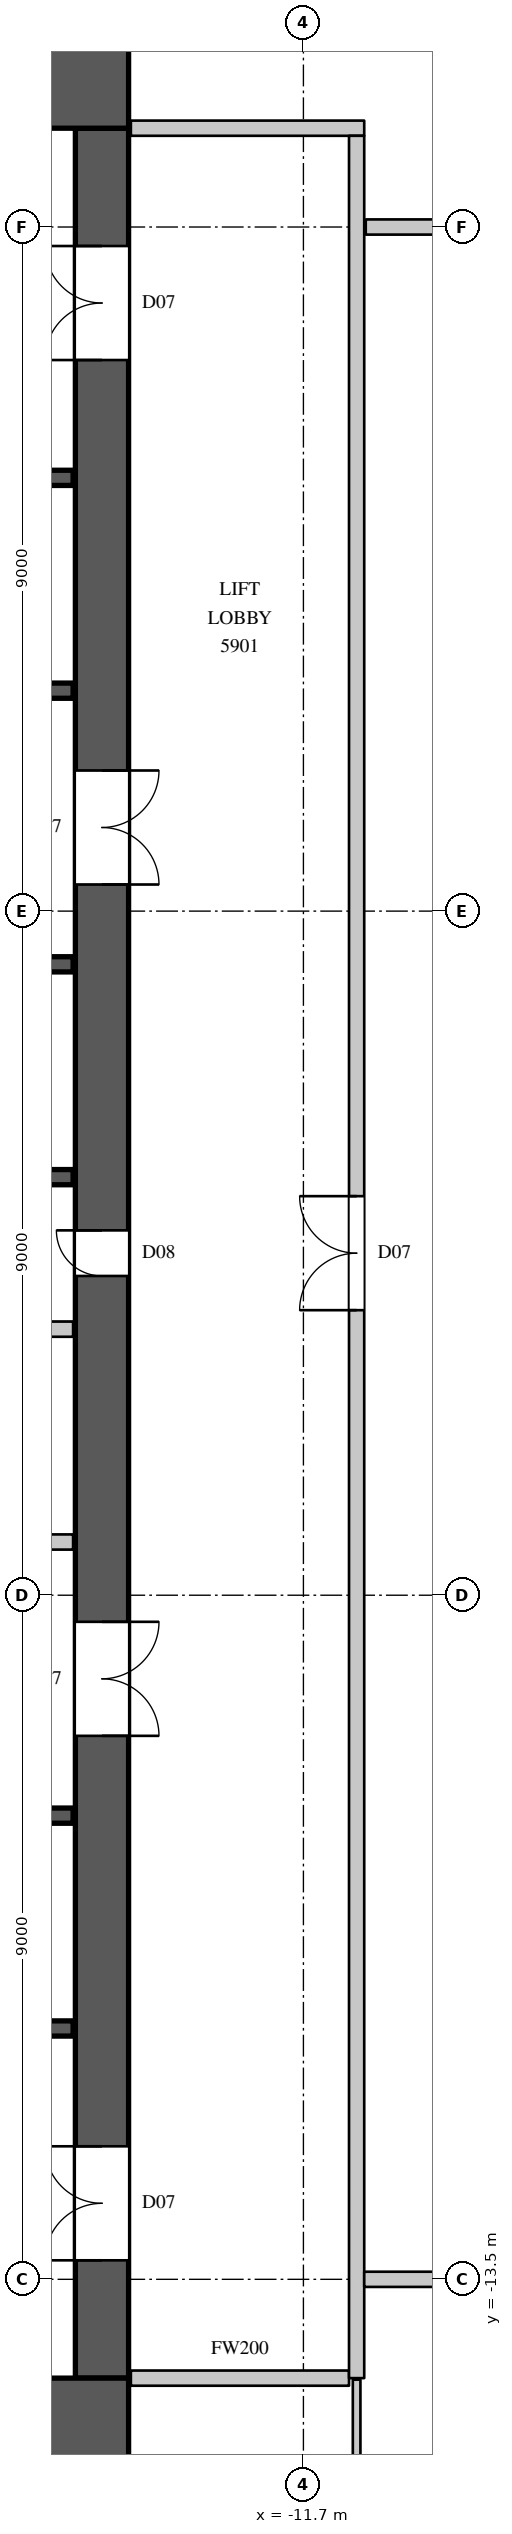
"""IFC4 building model, lengths in metres.
Left out: names, types, materials, properties, quantities, classifications, styles, units other than length and angle.
Written with IfcOpenShell. Run it as: python <this file> out.ifc"""

import sys

from ifc_helpers import new_model, si_unit, direction, frame, frame_2d, origin, place, context, subcontext, project, spatial, rectangle, extrude, element, fill, save


model = new_model("IFC4")
c1 = context("Model", 3, precision=1e-05, world=origin(), true_north=direction((0.0, 1.0)))
c2 = subcontext(c1, "Body", "Model", "MODEL_VIEW")
j1 = project(units=[si_unit("LENGTHUNIT", "METRE"), si_unit("PLANEANGLEUNIT", "RADIAN")], contexts=[c1])
p1 = place(None, origin())
s1 = spatial("IfcSite", under=j1, at=p1, CompositionType="ELEMENT")
p2 = place(p1, origin())
s2 = spatial("IfcBuilding", under=s1, at=p2, CompositionType="ELEMENT")
p3 = place(p2, frame((0.0, 0.0, 263.9)))
s3 = spatial("IfcBuildingStorey", under=s2, at=p3, CompositionType="ELEMENT", Elevation=263.9)
for number, where, z_axis, x_axis in (
    (1, (-30.0, 15.4, 0.0), (0.0, 0.0, 1.0), (1.0, 0.0, 0.0)),
    (2, (-30.0, -15.4, 0.0), (0.0, 0.0, 1.0), (1.0, 0.0, 0.0)),
):
    element("IfcWall", number, at=place(p3, frame(where, z_axis=z_axis, x_axis=x_axis)), inside=s3, PredefinedType="SHEAR", context=c2, shape_type="SweptSolid", body=[
        extrude(rectangle(XDim=16.0, YDim=1.2, at=frame_2d((8.0, 0.0))), origin(), (0.0, 0.0, 1.0), 4.1),
    ])
p4 = place(p3, frame((-14.35, -14.8, 0.0), z_axis=(0.0, 0.0, 1.0), x_axis=(0.0, 1.0, 0.0)))
e3 = element("IfcWall", 3, at=p4, inside=s3, PredefinedType="SHEAR", context=c2, shape_type="SweptSolid", body=[
    extrude(rectangle(XDim=29.6, YDim=0.7, at=frame_2d((14.8, 0.0))), origin(), (0.0, 0.0, 1.0), 4.1),
])
p5 = place(p4, frame((1.55, 0.0, 0.0)))
e4 = element("IfcOpeningElement", 4, at=p5, cuts=e3, PredefinedType="OPENING", context=c2, shape_type="SweptSolid", body=[
    extrude(rectangle(XDim=1.5, YDim=2.4, at=frame_2d((0.75, 1.2))), frame((0.0, 0.36, 0.0), z_axis=(0.0, -1.0, 0.0), x_axis=(1.0, 0.0, 0.0)), (0.0, 0.0, 1.0), 0.72),
])
p6 = place(p4, frame((26.55, 0.0, 0.0)))
e5 = element("IfcOpeningElement", 5, at=p6, cuts=e3, PredefinedType="OPENING", context=c2, shape_type="SweptSolid", body=[
    extrude(rectangle(XDim=1.5, YDim=2.4, at=frame_2d((0.75, 1.2))), frame((0.0, 0.36, 0.0), z_axis=(0.0, -1.0, 0.0), x_axis=(1.0, 0.0, 0.0)), (0.0, 0.0, 1.0), 0.72),
])
p7 = place(p4, frame((8.45, 0.0, 0.0)))
e6 = element("IfcOpeningElement", 6, at=p7, cuts=e3, PredefinedType="OPENING", context=c2, shape_type="SweptSolid", body=[
    extrude(rectangle(XDim=1.5, YDim=2.4, at=frame_2d((0.75, 1.2))), frame((0.0, 0.36, 0.0), z_axis=(0.0, -1.0, 0.0), x_axis=(1.0, 0.0, 0.0)), (0.0, 0.0, 1.0), 0.72),
])
p8 = place(p4, frame((19.65, 0.0, 0.0)))
e7 = element("IfcOpeningElement", 7, at=p8, cuts=e3, PredefinedType="OPENING", context=c2, shape_type="SweptSolid", body=[
    extrude(rectangle(XDim=1.5, YDim=2.4, at=frame_2d((0.75, 1.2))), frame((0.0, 0.36, 0.0), z_axis=(0.0, -1.0, 0.0), x_axis=(1.0, 0.0, 0.0)), (0.0, 0.0, 1.0), 0.72),
])
p9 = place(p4, frame((14.5, 0.0, 0.0)))
e8 = element("IfcOpeningElement", 8, at=p9, cuts=e3, PredefinedType="OPENING", context=c2, shape_type="SweptSolid", body=[
    extrude(rectangle(XDim=0.6, YDim=2.0, at=frame_2d((0.3, 1.0))), frame((0.0, 0.36, 0.0), z_axis=(0.0, -1.0, 0.0), x_axis=(1.0, 0.0, 0.0)), (0.0, 0.0, 1.0), 0.72),
])
p10 = place(p3, frame((-29.27, -3.8, 0.0), z_axis=(0.0, 0.0, 1.0), x_axis=(1.0, 0.0, 0.0)))
e9 = element("IfcWall", 9, at=p10, inside=s3, PredefinedType="PARTITIONING", context=c2, shape_type="SweptSolid", body=[
    extrude(rectangle(XDim=14.54, YDim=0.2, at=frame_2d((7.27, 0.0))), origin(), (0.0, 0.0, 1.0), 3.8),
])
p11 = place(p10, frame((6.8, 0.0, 0.0)))
e10 = element("IfcOpeningElement", 10, at=p11, cuts=e9, PredefinedType="OPENING", context=c2, shape_type="SweptSolid", body=[
    extrude(rectangle(XDim=0.9, YDim=2.2, at=frame_2d((0.45, 1.1))), frame((0.0, 0.11, 0.0), z_axis=(0.0, -1.0, 0.0), x_axis=(1.0, 0.0, 0.0)), (0.0, 0.0, 1.0), 0.22),
])
p12 = place(p3, frame((-13.97, -14.8, 0.0), z_axis=(0.0, 0.0, 1.0), x_axis=(1.0, 0.0, 0.0)))
e11 = element("IfcWall", 11, at=p12, inside=s3, PredefinedType="PARTITIONING", context=c2, shape_type="SweptSolid", body=[
    extrude(rectangle(XDim=2.87, YDim=0.2, at=frame_2d((1.435, 0.0))), origin(), (0.0, 0.0, 1.0), 3.8),
])
p13 = place(p3, frame((-13.97, 14.8, 0.0), z_axis=(0.0, 0.0, 1.0), x_axis=(1.0, 0.0, 0.0)))
e12 = element("IfcWall", 12, at=p13, inside=s3, PredefinedType="PARTITIONING", context=c2, shape_type="SweptSolid", body=[
    extrude(rectangle(XDim=3.07, YDim=0.2, at=frame_2d((1.535, 0.0))), origin(), (0.0, 0.0, 1.0), 3.8),
])
p14 = place(p3, frame((-11.0, -14.8, 0.0), z_axis=(0.0, 0.0, 1.0), x_axis=(0.0, 1.0, 0.0)))
e13 = element("IfcWall", 13, at=p14, inside=s3, PredefinedType="PARTITIONING", context=c2, shape_type="SweptSolid", body=[
    extrude(rectangle(XDim=29.5, YDim=0.2, at=frame_2d((14.75, 0.0))), origin(), (0.0, 0.0, 1.0), 3.8),
])
p15 = place(p14, frame((14.05, 0.0, 0.0)))
e14 = element("IfcOpeningElement", 14, at=p15, cuts=e13, PredefinedType="OPENING", context=c2, shape_type="SweptSolid", body=[
    extrude(rectangle(XDim=1.5, YDim=2.4, at=frame_2d((0.75, 1.2))), frame((0.0, 0.11, 0.0), z_axis=(0.0, -1.0, 0.0), x_axis=(1.0, 0.0, 0.0)), (0.0, 0.0, 1.0), 0.22),
])
p16 = place(p3, frame((-10.9, -13.5, 0.0), z_axis=(0.0, 0.0, 1.0), x_axis=(1.0, 0.0, 0.0)))
e15 = element("IfcWall", 15, at=p16, inside=s3, PredefinedType="PARTITIONING", context=c2, shape_type="SweptSolid", body=[
    extrude(rectangle(XDim=23.3, YDim=0.2, at=frame_2d((11.65, 0.0))), origin(), (0.0, 0.0, 1.0), 3.8),
])
p17 = place(p16, frame((1.1, 0.0, 0.0)))
e16 = element("IfcOpeningElement", 16, at=p17, cuts=e15, PredefinedType="OPENING", context=c2, shape_type="SweptSolid", body=[
    extrude(rectangle(XDim=0.9, YDim=2.2, at=frame_2d((0.45, 1.1))), frame((0.0, 0.11, 0.0), z_axis=(0.0, -1.0, 0.0), x_axis=(1.0, 0.0, 0.0)), (0.0, 0.0, 1.0), 0.22),
])
p18 = place(p16, frame((4.4, 0.0, 0.0)))
e17 = element("IfcOpeningElement", 17, at=p18, cuts=e15, PredefinedType="OPENING", context=c2, shape_type="SweptSolid", body=[
    extrude(rectangle(XDim=0.9, YDim=2.2, at=frame_2d((0.45, 1.1))), frame((0.0, 0.11, 0.0), z_axis=(0.0, -1.0, 0.0), x_axis=(1.0, 0.0, 0.0)), (0.0, 0.0, 1.0), 0.22),
])
p19 = place(p16, frame((7.25, 0.0, 0.0)))
e18 = element("IfcOpeningElement", 18, at=p19, cuts=e15, PredefinedType="OPENING", context=c2, shape_type="SweptSolid", body=[
    extrude(rectangle(XDim=0.9, YDim=2.2, at=frame_2d((0.45, 1.1))), frame((0.0, 0.11, 0.0), z_axis=(0.0, -1.0, 0.0), x_axis=(1.0, 0.0, 0.0)), (0.0, 0.0, 1.0), 0.22),
])
p20 = place(p16, frame((10.6, 0.0, 0.0)))
e19 = element("IfcOpeningElement", 19, at=p20, cuts=e15, PredefinedType="OPENING", context=c2, shape_type="SweptSolid", body=[
    extrude(rectangle(XDim=1.1, YDim=2.4, at=frame_2d((0.55, 1.2))), frame((0.0, 0.11, 0.0), z_axis=(0.0, -1.0, 0.0), x_axis=(1.0, 0.0, 0.0)), (0.0, 0.0, 1.0), 0.22),
])
p21 = place(p3, frame((-10.88, 13.5, 0.0), z_axis=(0.0, 0.0, 1.0), x_axis=(1.0, 0.0, 0.0)))
e20 = element("IfcWall", 20, at=p21, inside=s3, PredefinedType="PARTITIONING", context=c2, shape_type="SweptSolid", body=[
    extrude(rectangle(XDim=4.58, YDim=0.2, at=frame_2d((2.29, 0.0))), origin(), (0.0, 0.0, 1.0), 3.8),
])
p22 = place(p3, frame((-29.27, -1.0, 0.0), z_axis=(0.0, 0.0, 1.0), x_axis=(1.0, 0.0, 0.0)))
e21 = element("IfcWall", 21, at=p22, inside=s3, PredefinedType="PARTITIONING", context=c2, shape_type="SweptSolid", body=[
    extrude(rectangle(XDim=14.54, YDim=0.2, at=frame_2d((7.27, 0.0))), origin(), (0.0, 0.0, 1.0), 3.8),
])
p23 = place(p3, frame((-17.92, -10.2, 0.0), z_axis=(0.0, 0.0, 1.0), x_axis=(1.0, 0.0, 0.0)))
e22 = element("IfcWall", 22, at=p23, inside=s3, PredefinedType="SHEAR", context=c2, shape_type="SweptSolid", body=[
    extrude(rectangle(XDim=3.19, YDim=0.2, at=frame_2d((1.595, 0.0))), origin(), (0.0, 0.0, 1.0), 3.8),
])
p24 = place(p23, frame((1.05, 0.0, 0.0)))
e23 = element("IfcOpeningElement", 23, at=p24, cuts=e22, PredefinedType="OPENING", context=c2, shape_type="SweptSolid", body=[
    extrude(rectangle(XDim=1.1, YDim=2.2, at=frame_2d((0.55, 1.1))), frame((0.0, 0.11, 0.0), z_axis=(0.0, -1.0, 0.0), x_axis=(1.0, 0.0, 0.0)), (0.0, 0.0, 1.0), 0.22),
])
for number, where, z_axis, x_axis in (
    (24, (-17.9, -7.4, 0.0), (0.0, 0.0, 1.0), (1.0, 0.0, 0.0)),
    (25, (-17.9, 1.0, 0.0), (0.0, 0.0, 1.0), (1.0, 0.0, 0.0)),
):
    element("IfcWall", number, at=place(p3, frame(where, z_axis=z_axis, x_axis=x_axis)), inside=s3, PredefinedType="SHEAR", context=c2, shape_type="SweptSolid", body=[
        extrude(rectangle(XDim=3.17, YDim=0.2, at=frame_2d((1.585, 0.0))), origin(), (0.0, 0.0, 1.0), 3.8),
    ])
p25 = place(p3, frame((-17.9, 3.8, 0.0), z_axis=(0.0, 0.0, 1.0), x_axis=(1.0, 0.0, 0.0)))
e26 = element("IfcWall", 26, at=p25, inside=s3, PredefinedType="SHEAR", context=c2, shape_type="SweptSolid", body=[
    extrude(rectangle(XDim=3.17, YDim=0.2, at=frame_2d((1.585, 0.0))), origin(), (0.0, 0.0, 1.0), 3.8),
])
p26 = place(p25, frame((1.05, 0.0, 0.0)))
e27 = element("IfcOpeningElement", 27, at=p26, cuts=e26, PredefinedType="OPENING", context=c2, shape_type="SweptSolid", body=[
    extrude(rectangle(XDim=1.1, YDim=2.2, at=frame_2d((0.55, 1.1))), frame((0.0, 0.11, 0.0), z_axis=(0.0, -1.0, 0.0), x_axis=(1.0, 0.0, 0.0)), (0.0, 0.0, 1.0), 0.22),
])
p27 = place(p3, frame((-17.92, 7.4, 0.0), z_axis=(0.0, 0.0, 1.0), x_axis=(1.0, 0.0, 0.0)))
e28 = element("IfcWall", 28, at=p27, inside=s3, PredefinedType="SHEAR", context=c2, shape_type="SweptSolid", body=[
    extrude(rectangle(XDim=3.19, YDim=0.2, at=frame_2d((1.595, 0.0))), origin(), (0.0, 0.0, 1.0), 3.8),
])
p28 = place(p3, frame((-17.92, 10.2, 0.0), z_axis=(0.0, 0.0, 1.0), x_axis=(1.0, 0.0, 0.0)))
e29 = element("IfcWall", 29, at=p28, inside=s3, PredefinedType="SHEAR", context=c2, shape_type="SweptSolid", body=[
    extrude(rectangle(XDim=3.19, YDim=0.2, at=frame_2d((1.595, 0.0))), origin(), (0.0, 0.0, 1.0), 3.8),
])
p29 = place(p28, frame((1.05, 0.0, 0.0)))
e30 = element("IfcOpeningElement", 30, at=p29, cuts=e29, PredefinedType="OPENING", context=c2, shape_type="SweptSolid", body=[
    extrude(rectangle(XDim=1.1, YDim=2.2, at=frame_2d((0.55, 1.1))), frame((0.0, 0.11, 0.0), z_axis=(0.0, -1.0, 0.0), x_axis=(1.0, 0.0, 0.0)), (0.0, 0.0, 1.0), 0.22),
])
p30 = place(p3, frame((-11.0, -23.757, 0.0), z_axis=(0.0, 0.0, 1.0), x_axis=(0.0, 1.0, 0.0)))
e31 = element("IfcWall", 31, at=p30, inside=s3, PredefinedType="PARTITIONING", context=c2, shape_type="SweptSolid", body=[
    extrude(rectangle(XDim=8.937, YDim=0.1, at=frame_2d((4.468, 0.0))), origin(), (0.0, 0.0, 1.0), 3.8),
])
p31 = place(p15, origin())
e32 = element("IfcDoor", 32, at=p31, inside=s3, OperationType="DOUBLE_DOOR_SINGLE_SWING", PredefinedType="DOOR", context=c2, shape_type="SweptSolid", body=[
    extrude(rectangle(XDim=1.5, YDim=2.4, at=frame_2d((0.75, 1.2))), frame((0.0, 0.025, 0.0), z_axis=(0.0, -1.0, 0.0), x_axis=(1.0, 0.0, 0.0)), (0.0, 0.0, 1.0), 0.05),
])
fill(e14, e32)
p32 = place(p5, origin())
e33 = element("IfcDoor", 33, at=p32, inside=s3, OperationType="DOUBLE_DOOR_SINGLE_SWING", PredefinedType="DOOR", context=c2, shape_type="SweptSolid", body=[
    extrude(rectangle(XDim=1.5, YDim=2.4, at=frame_2d((0.75, 1.2))), frame((0.0, 0.345, 0.0), z_axis=(0.0, -1.0, 0.0), x_axis=(1.0, 0.0, 0.0)), (0.0, 0.0, 1.0), 0.05),
])
fill(e4, e33)
p33 = place(p6, origin())
e34 = element("IfcDoor", 34, at=p33, inside=s3, OperationType="DOUBLE_DOOR_SINGLE_SWING", PredefinedType="DOOR", context=c2, shape_type="SweptSolid", body=[
    extrude(rectangle(XDim=1.5, YDim=2.4, at=frame_2d((0.75, 1.2))), frame((0.0, 0.345, 0.0), z_axis=(0.0, -1.0, 0.0), x_axis=(1.0, 0.0, 0.0)), (0.0, 0.0, 1.0), 0.05),
])
fill(e5, e34)
p34 = place(p7, origin())
e35 = element("IfcDoor", 35, at=p34, inside=s3, OperationType="DOUBLE_DOOR_SINGLE_SWING", PredefinedType="DOOR", context=c2, shape_type="SweptSolid", body=[
    extrude(rectangle(XDim=1.5, YDim=2.4, at=frame_2d((0.75, 1.2))), frame((0.0, -0.295, 0.0), z_axis=(0.0, -1.0, 0.0), x_axis=(1.0, 0.0, 0.0)), (0.0, 0.0, 1.0), 0.05),
])
fill(e6, e35)
p35 = place(p8, origin())
e36 = element("IfcDoor", 36, at=p35, inside=s3, OperationType="DOUBLE_DOOR_SINGLE_SWING", PredefinedType="DOOR", context=c2, shape_type="SweptSolid", body=[
    extrude(rectangle(XDim=1.5, YDim=2.4, at=frame_2d((0.75, 1.2))), frame((0.0, -0.295, 0.0), z_axis=(0.0, -1.0, 0.0), x_axis=(1.0, 0.0, 0.0)), (0.0, 0.0, 1.0), 0.05),
])
fill(e7, e36)
p36 = place(p9, origin())
e37 = element("IfcDoor", 37, at=p36, inside=s3, OperationType="SINGLE_SWING_RIGHT", PredefinedType="DOOR", context=c2, shape_type="SweptSolid", body=[
    extrude(rectangle(XDim=0.6, YDim=2.0, at=frame_2d((0.3, 1.0))), frame((0.0, 0.345, 0.0), z_axis=(0.0, -1.0, 0.0), x_axis=(1.0, 0.0, 0.0)), (0.0, 0.0, 1.0), 0.05),
])
fill(e8, e37)
save(model, sys.argv[1])
